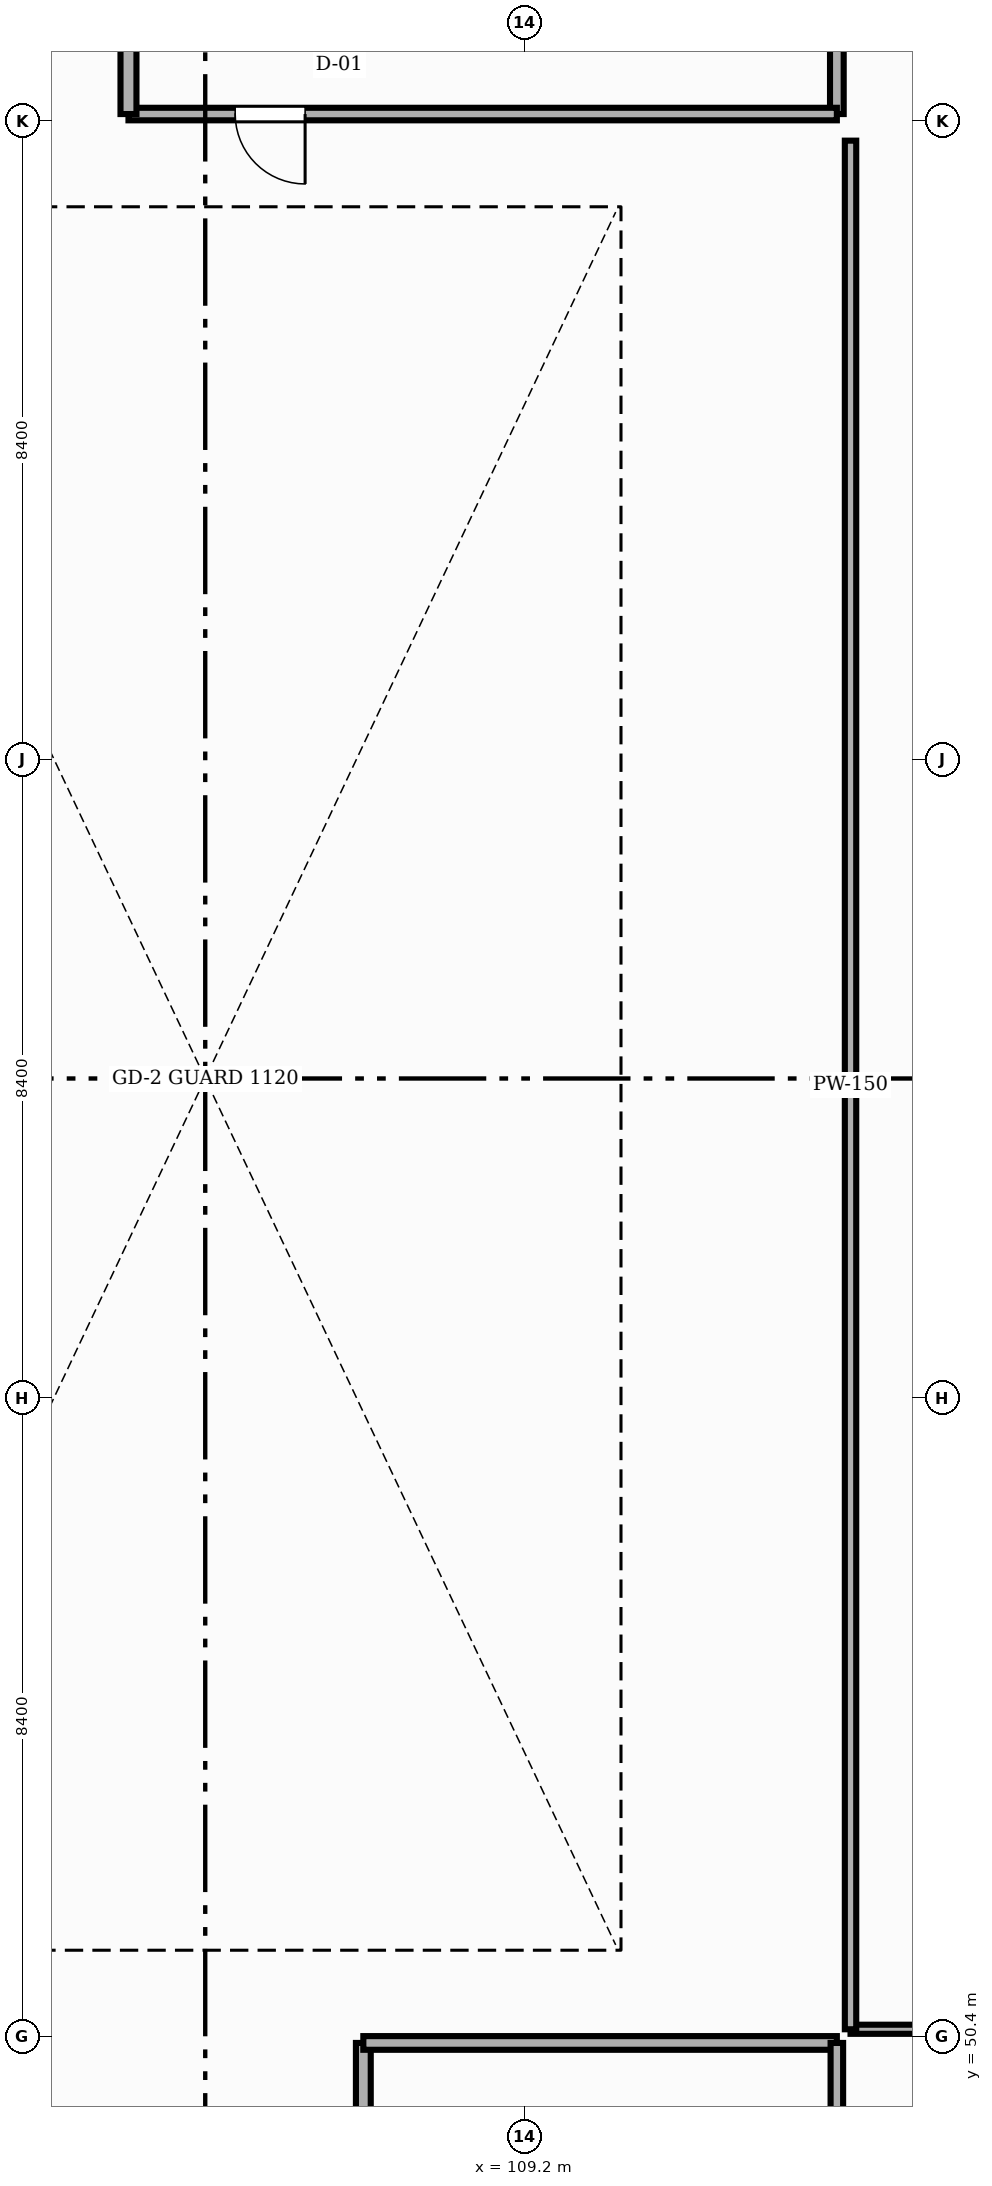
"""IFC4 building model, lengths in metres.
Left out: names, types, materials, properties, quantities, classifications, styles, units other than length and angle.
Written with IfcOpenShell. Run it as: python <this file> out.ifc"""

import sys

from ifc_helpers import new_model, si_unit, direction, frame, frame_2d, origin, place, context, subcontext, project, spatial, rectangle, extrude, element, fill, save


model = new_model("IFC4")
c1 = context("Model", 3, precision=1e-05, world=origin(), true_north=direction((0.0, 1.0)))
c2 = subcontext(c1, "Body", "Model", "MODEL_VIEW")
j1 = project(units=[si_unit("LENGTHUNIT", "METRE"), si_unit("PLANEANGLEUNIT", "RADIAN")], contexts=[c1])
p1 = place(None, origin())
s1 = spatial("IfcSite", under=j1, at=p1, CompositionType="ELEMENT")
p2 = place(p1, origin())
s2 = spatial("IfcBuilding", under=s1, at=p2, CompositionType="ELEMENT")
p3 = place(p2, frame((0.0, 0.0, 5.4)))
s3 = spatial("IfcBuildingStorey", under=s2, at=p3, CompositionType="ELEMENT", Elevation=5.4)
p4 = place(p3, frame((113.31, 97.9, -0.004), z_axis=(0.0, 0.0, 1.0), x_axis=(0.0, -1.0, 0.0)))
e1 = element("IfcWall", 1, at=p4, inside=s3, PredefinedType="STANDARD", context=c2, shape_type="SweptSolid", body=[
    extrude(rectangle(XDim=22.21, YDim=0.18, at=frame_2d((11.105, 0.0))), origin(), (0.0, 0.0, 1.0), 4.294),
])
p5 = place(p3, frame((113.31, 75.69, -0.004), z_axis=(0.0, 0.0, 1.0), x_axis=(-1.0, 0.0, 0.0)))
e2 = element("IfcWall", 2, at=p5, inside=s3, PredefinedType="STANDARD", context=c2, shape_type="SweptSolid", body=[
    extrude(rectangle(XDim=9.32, YDim=0.165, at=frame_2d((4.66, 0.0))), origin(), (0.0, 0.0, 1.0), 3.286),
])
p6 = place(p5, frame((6.996, 0.0, 0.0)))
e3 = element("IfcOpeningElement", 3, at=p6, cuts=e2, PredefinedType="OPENING", context=c2, shape_type="SweptSolid", body=[
    extrude(rectangle(XDim=0.92, YDim=2.06, at=frame_2d((0.46, 1.03))), frame((0.0, 0.093, 0.0), z_axis=(0.0, -1.0, 0.0), x_axis=(1.0, 0.0, 0.0)), (0.0, 0.0, 1.0), 0.185),
])
p7 = place(p3, frame((103.99, 75.69, -0.004), z_axis=(0.0, 0.0, 1.0), x_axis=(0.0, 1.0, 0.0)))
e4 = element("IfcWall", 4, at=p7, inside=s3, PredefinedType="STANDARD", context=c2, shape_type="SweptSolid", body=[
    extrude(rectangle(XDim=13.53, YDim=0.21, at=frame_2d((6.765, 0.0))), origin(), (0.0, 0.0, 1.0), 3.986),
])
p8 = place(p7, frame((4.275, 0.0, 0.0)))
e5 = element("IfcOpeningElement", 5, at=p8, cuts=e4, PredefinedType="OPENING", context=c2, shape_type="SweptSolid", body=[
    extrude(rectangle(XDim=0.92, YDim=2.3, at=frame_2d((0.46, 1.15))), frame((0.0, 0.115, 0.0), z_axis=(0.0, -1.0, 0.0), x_axis=(1.0, 0.0, 0.0)), (0.0, 0.0, 1.0), 0.23),
])
p9 = place(p3, frame((107.08, 43.91, -0.004), z_axis=(0.0, 0.0, 1.0), x_axis=(0.0, 1.0, 0.0)))
e6 = element("IfcWall", 6, at=p9, inside=s3, PredefinedType="STANDARD", context=c2, shape_type="SweptSolid", body=[
    extrude(rectangle(XDim=6.4, YDim=0.195, at=frame_2d((3.2, 0.0))), origin(), (0.0, 0.0, 1.0), 4.294),
])
p10 = place(p9, frame((1.65, 0.0, 0.0)))
e7 = element("IfcOpeningElement", 7, at=p10, cuts=e6, PredefinedType="OPENING", context=c2, shape_type="SweptSolid", body=[
    extrude(rectangle(XDim=1.18, YDim=2.3, at=frame_2d((0.59, 1.15))), frame((0.0, 0.107, 0.0), z_axis=(0.0, -1.0, 0.0), x_axis=(1.0, 0.0, 0.0)), (0.0, 0.0, 1.0), 0.215),
])
p11 = place(p3, frame((107.08, 50.31, -0.004), z_axis=(0.0, 0.0, 1.0), x_axis=(1.0, 0.0, 0.0)))
e8 = element("IfcWall", 8, at=p11, inside=s3, PredefinedType="STANDARD", context=c2, shape_type="SweptSolid", body=[
    extrude(rectangle(XDim=6.23, YDim=0.18, at=frame_2d((3.115, 0.0))), origin(), (0.0, 0.0, 1.0), 3.286),
])
p12 = place(p3, frame((113.31, 50.31, -0.004), z_axis=(0.0, 0.0, 1.0), x_axis=(0.0, -1.0, 0.0)))
e9 = element("IfcWall", 9, at=p12, inside=s3, PredefinedType="STANDARD", context=c2, shape_type="SweptSolid", body=[
    extrude(rectangle(XDim=17.33, YDim=0.165, at=frame_2d((8.665, 0.0))), origin(), (0.0, 0.0, 1.0), 4.294),
])
p13 = place(p3, frame((117.18, 50.49, -0.004), z_axis=(0.0, 0.0, 1.0), x_axis=(-1.0, 0.0, 0.0)))
e10 = element("IfcWall", 10, at=p13, inside=s3, PredefinedType="STANDARD", context=c2, shape_type="SweptSolid", body=[
    extrude(rectangle(XDim=3.69, YDim=0.12, at=frame_2d((1.845, 0.0))), origin(), (0.0, 0.0, 1.0), 3.286),
])
p14 = place(p3, frame((113.49, 50.49, -0.004), z_axis=(0.0, 0.0, 1.0), x_axis=(0.0, 1.0, 0.0)))
e11 = element("IfcWall", 11, at=p14, inside=s3, PredefinedType="STANDARD", context=c2, shape_type="SweptSolid", body=[
    extrude(rectangle(XDim=24.85, YDim=0.15, at=frame_2d((12.425, 0.0))), origin(), (0.0, 0.0, 1.0), 4.294),
])
p15 = place(p6, origin())
e12 = element("IfcDoor", 12, at=p15, inside=s3, OperationType="SINGLE_SWING_LEFT", PredefinedType="DOOR", context=c2, shape_type="SweptSolid", body=[
    extrude(rectangle(XDim=0.92, YDim=2.06, at=frame_2d((0.46, 1.03))), frame((0.0, 0.025, 0.0), z_axis=(0.0, -1.0, 0.0), x_axis=(1.0, 0.0, 0.0)), (0.0, 0.0, 1.0), 0.05),
])
fill(e3, e12)
save(model, sys.argv[1])
